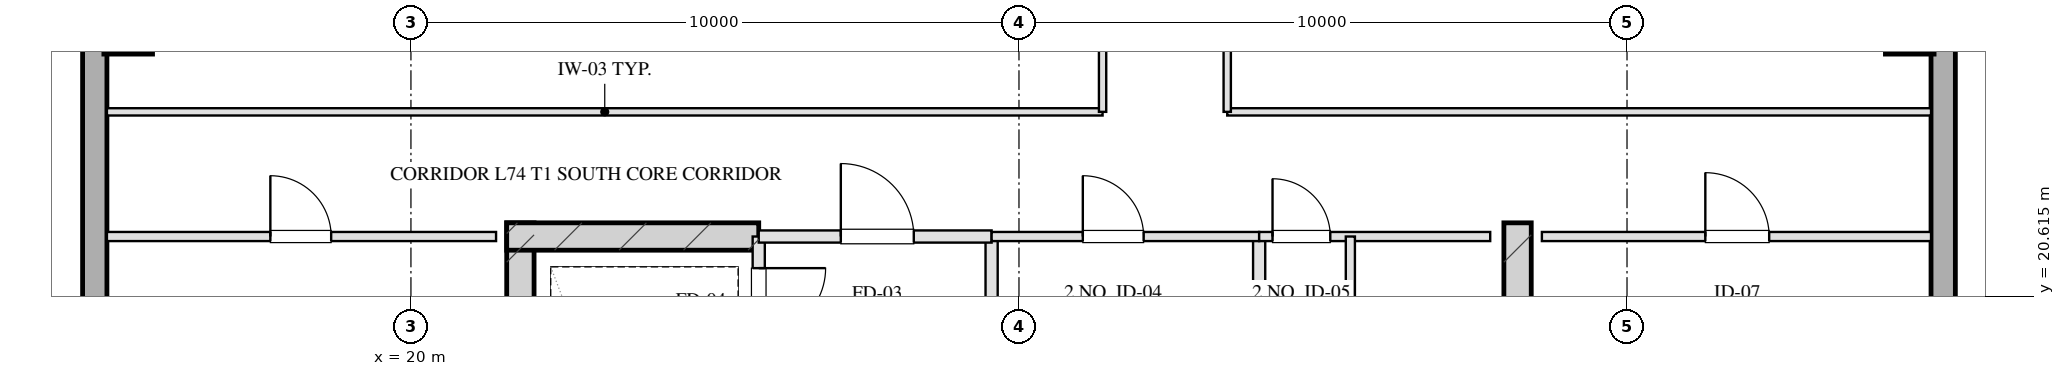
"""IFC4 building model, lengths in metres.
Left out: names, types, materials, properties, quantities, classifications, styles, units other than length and angle.
Written with IfcOpenShell. Run it as: python <this file> out.ifc"""

import sys

from ifc_helpers import new_model, si_unit, direction, frame, frame_2d, origin, origin_2d, place, context, subcontext, project, spatial, rectangle, hollow_rectangle, extrude, element, fill, save


model = new_model("IFC4")
c1 = context("Model", 3, precision=1e-05, world=origin(), true_north=direction((0.0, 1.0)))
c2 = subcontext(c1, "Body", "Model", "MODEL_VIEW")
j1 = project(units=[si_unit("LENGTHUNIT", "METRE"), si_unit("PLANEANGLEUNIT", "RADIAN")], contexts=[c1])
p1 = place(None, origin())
s1 = spatial("IfcSite", under=j1, at=p1, CompositionType="ELEMENT")
p2 = place(p1, origin())
s2 = spatial("IfcBuilding", under=s1, at=p2, CompositionType="ELEMENT")
p3 = place(p2, frame((0.0, 0.0, 269.6)))
s3 = spatial("IfcBuildingStorey", under=s2, at=p3, CompositionType="ELEMENT", Elevation=269.6)
for number, where, z_axis, x_axis in (
    (1, (21.8, 21.825, 0.0), (0.0, 0.0, 1.0), (0.0, -1.0, 0.0)),
    (2, (38.2, 21.825, 0.0), (0.0, 0.0, 1.0), (0.0, -1.0, 0.0)),
):
    element("IfcWall", number, at=place(p3, frame(where, z_axis=z_axis, x_axis=x_axis)), inside=s3, PredefinedType="SHEAR", context=c2, shape_type="SweptSolid", body=[
        extrude(rectangle(XDim=9.33, YDim=0.45, at=frame_2d((4.665, 0.0))), origin(), (0.0, 0.0, 1.0), 3.2),
    ])
p4 = place(p3, frame((21.575, 21.6, 0.0), z_axis=(0.0, 0.0, 1.0), x_axis=(1.0, 0.0, 0.0)))
e3 = element("IfcWall", 3, at=p4, inside=s3, PredefinedType="SHEAR", context=c2, shape_type="SweptSolid", body=[
    extrude(rectangle(XDim=4.145, YDim=0.45, at=frame_2d((2.073, 0.0))), origin(), (0.0, 0.0, 1.0), 3.2),
])
for number, where, z_axis, x_axis in (
    (4, (15.35, 25.0, 0.0), (0.0, 0.0, 1.0), (1.0, 0.0, 0.0)),
    (5, (44.65, 25.0, 0.0), (0.0, 0.0, 1.0), (1.0, 0.0, 0.0)),
):
    element("IfcColumn", number, at=place(p3, frame(where, z_axis=z_axis, x_axis=x_axis)), inside=s3, PredefinedType="COLUMN", context=c2, shape_type="SweptSolid", body=[
        extrude(hollow_rectangle(XDim=0.8, YDim=0.8, WallThickness=0.028, at=origin_2d()), origin(), (0.0, 0.0, 1.0), 3.201),
    ])
p5 = place(p3, frame((14.8, 13.1, 0.0), z_axis=(0.0, 0.0, 1.0), x_axis=(0.0, 1.0, 0.0)))
e6 = element("IfcWall", 6, at=p5, inside=s3, PredefinedType="SOLIDWALL", context=c2, shape_type="SweptSolid", body=[
    extrude(rectangle(XDim=41.8, YDim=0.4, at=frame_2d((20.9, 0.0))), origin(), (0.0, 0.0, 1.0), 2.36),
])
p6 = place(p5, frame((22.525, 0.0, 0.75)))
e7 = element("IfcOpeningElement", 7, at=p6, cuts=e6, PredefinedType="OPENING", context=c2, shape_type="SweptSolid", body=[
    extrude(rectangle(XDim=1.95, YDim=1.21, at=frame_2d((0.975, 0.605))), frame((0.0, 0.21, 0.0), z_axis=(0.0, -1.0, 0.0), x_axis=(1.0, 0.0, 0.0)), (0.0, 0.0, 1.0), 0.42),
])
p7 = place(p5, frame((26.325, 0.0, 0.75)))
e8 = element("IfcOpeningElement", 8, at=p7, cuts=e6, PredefinedType="OPENING", context=c2, shape_type="SweptSolid", body=[
    extrude(rectangle(XDim=1.95, YDim=1.21, at=frame_2d((0.975, 0.605))), frame((0.0, 0.21, 0.0), z_axis=(0.0, -1.0, 0.0), x_axis=(1.0, 0.0, 0.0)), (0.0, 0.0, 1.0), 0.42),
])
p8 = place(p5, frame((14.55, 0.0, 0.0)))
e9 = element("IfcOpeningElement", 9, at=p8, cuts=e6, PredefinedType="OPENING", context=c2, shape_type="SweptSolid", body=[
    extrude(rectangle(XDim=1.1, YDim=2.15, at=frame_2d((0.55, 1.075))), frame((0.0, 0.21, 0.0), z_axis=(0.0, -1.0, 0.0), x_axis=(1.0, 0.0, 0.0)), (0.0, 0.0, 1.0), 0.42),
])
p9 = place(p3, frame((45.2, 54.9, 0.0), z_axis=(0.0, 0.0, 1.0), x_axis=(0.0, -1.0, 0.0)))
e10 = element("IfcWall", 10, at=p9, inside=s3, PredefinedType="SOLIDWALL", context=c2, shape_type="SweptSolid", body=[
    extrude(rectangle(XDim=41.8, YDim=0.4, at=frame_2d((20.9, 0.0))), origin(), (0.0, 0.0, 1.0), 2.36),
])
p10 = place(p9, frame((17.325, 0.0, 0.75)))
e11 = element("IfcOpeningElement", 11, at=p10, cuts=e10, PredefinedType="OPENING", context=c2, shape_type="SweptSolid", body=[
    extrude(rectangle(XDim=1.95, YDim=1.21, at=frame_2d((0.975, 0.605))), frame((0.0, 0.21, 0.0), z_axis=(0.0, -1.0, 0.0), x_axis=(1.0, 0.0, 0.0)), (0.0, 0.0, 1.0), 0.42),
])
p11 = place(p9, frame((13.525, 0.0, 0.75)))
e12 = element("IfcOpeningElement", 12, at=p11, cuts=e10, PredefinedType="OPENING", context=c2, shape_type="SweptSolid", body=[
    extrude(rectangle(XDim=1.95, YDim=1.21, at=frame_2d((0.975, 0.605))), frame((0.0, 0.21, 0.0), z_axis=(0.0, -1.0, 0.0), x_axis=(1.0, 0.0, 0.0)), (0.0, 0.0, 1.0), 0.42),
])
p12 = place(p9, frame((23.45, 0.0, 0.0)))
e13 = element("IfcOpeningElement", 13, at=p12, cuts=e10, PredefinedType="OPENING", context=c2, shape_type="SweptSolid", body=[
    extrude(rectangle(XDim=1.1, YDim=2.15, at=frame_2d((0.55, 1.075))), frame((0.0, 0.21, 0.0), z_axis=(0.0, -1.0, 0.0), x_axis=(1.0, 0.0, 0.0)), (0.0, 0.0, 1.0), 0.42),
])
p13 = place(p3, frame((25.72, 21.6, 0.0), z_axis=(0.0, 0.0, 1.0), x_axis=(0.0, -1.0, 0.0)))
e14 = element("IfcWall", 14, at=p13, inside=s3, PredefinedType="PARTITIONING", context=c2, shape_type="SweptSolid", body=[
    extrude(rectangle(XDim=1.9, YDim=0.2, at=frame_2d((0.95, 0.0))), origin(), (0.0, 0.0, 1.0), 2.925),
])
p14 = place(p13, frame((0.52, 0.0, 0.0)))
e15 = element("IfcOpeningElement", 15, at=p14, cuts=e14, PredefinedType="OPENING", context=c2, shape_type="SweptSolid", body=[
    extrude(rectangle(XDim=1.1, YDim=2.05, at=frame_2d((0.55, 1.025))), frame((0.0, 0.11, 0.0), z_axis=(0.0, -1.0, 0.0), x_axis=(1.0, 0.0, 0.0)), (0.0, 0.0, 1.0), 0.22),
])
p15 = place(p3, frame((29.55, 21.6, 0.0), z_axis=(0.0, 0.0, 1.0), x_axis=(0.0, -1.0, 0.0)))
e16 = element("IfcWall", 16, at=p15, inside=s3, PredefinedType="PARTITIONING", context=c2, shape_type="SweptSolid", body=[
    extrude(rectangle(XDim=8.43, YDim=0.2, at=frame_2d((4.215, 0.0))), origin(), (0.0, 0.0, 1.0), 2.925),
])
p16 = place(p3, frame((25.72, 21.6, 0.0), z_axis=(0.0, 0.0, 1.0), x_axis=(1.0, 0.0, 0.0)))
e17 = element("IfcWall", 17, at=p16, inside=s3, PredefinedType="PARTITIONING", context=c2, shape_type="SweptSolid", body=[
    extrude(rectangle(XDim=3.83, YDim=0.2, at=frame_2d((1.915, 0.0))), origin(), (0.0, 0.0, 1.0), 2.925),
])
p17 = place(p16, frame((1.35, 0.0, 0.0)))
e18 = element("IfcOpeningElement", 18, at=p17, cuts=e17, PredefinedType="OPENING", context=c2, shape_type="SweptSolid", body=[
    extrude(rectangle(XDim=1.2, YDim=2.05, at=frame_2d((0.6, 1.025))), frame((0.0, 0.11, 0.0), z_axis=(0.0, -1.0, 0.0), x_axis=(1.0, 0.0, 0.0)), (0.0, 0.0, 1.0), 0.22),
])
p18 = place(p3, frame((33.95, 21.6, 0.0), z_axis=(0.0, 0.0, 1.0), x_axis=(0.0, -1.0, 0.0)))
e19 = element("IfcWall", 19, at=p18, inside=s3, PredefinedType="PARTITIONING", context=c2, shape_type="SweptSolid", body=[
    extrude(rectangle(XDim=8.43, YDim=0.2, at=frame_2d((4.215, 0.0))), origin(), (0.0, 0.0, 1.0), 2.925),
])
p19 = place(p3, frame((29.55, 21.6, 0.0), z_axis=(0.0, 0.0, 1.0), x_axis=(1.0, 0.0, 0.0)))
e20 = element("IfcWall", 20, at=p19, inside=s3, PredefinedType="PARTITIONING", context=c2, shape_type="SweptSolid", body=[
    extrude(rectangle(XDim=4.4, YDim=0.15, at=frame_2d((2.2, 0.0))), origin(), (0.0, 0.0, 1.0), 2.925),
])
p20 = place(p19, frame((1.5, 0.0, 0.0)))
e21 = element("IfcOpeningElement", 21, at=p20, cuts=e20, PredefinedType="OPENING", context=c2, shape_type="SweptSolid", body=[
    extrude(rectangle(XDim=1.0, YDim=2.05, at=frame_2d((0.5, 1.025))), frame((0.0, 0.085, 0.0), z_axis=(0.0, -1.0, 0.0), x_axis=(1.0, 0.0, 0.0)), (0.0, 0.0, 1.0), 0.17),
])
p21 = place(p3, frame((33.95, 21.6, 0.0), z_axis=(0.0, 0.0, 1.0), x_axis=(1.0, 0.0, 0.0)))
e22 = element("IfcWall", 22, at=p21, inside=s3, PredefinedType="PARTITIONING", context=c2, shape_type="SweptSolid", body=[
    extrude(rectangle(XDim=3.8, YDim=0.15, at=frame_2d((1.9, 0.0))), origin(), (0.0, 0.0, 1.0), 2.925),
])
p22 = place(p21, frame((0.22, 0.0, 0.0)))
e23 = element("IfcOpeningElement", 23, at=p22, cuts=e22, PredefinedType="OPENING", context=c2, shape_type="SweptSolid", body=[
    extrude(rectangle(XDim=0.95, YDim=2.05, at=frame_2d((0.475, 1.025))), frame((0.0, 0.085, 0.0), z_axis=(0.0, -1.0, 0.0), x_axis=(1.0, 0.0, 0.0)), (0.0, 0.0, 1.0), 0.17),
])
p23 = place(p3, frame((35.45, 21.6, 0.0), z_axis=(0.0, 0.0, 1.0), x_axis=(0.0, -1.0, 0.0)))
e24 = element("IfcWall", 24, at=p23, inside=s3, PredefinedType="PARTITIONING", context=c2, shape_type="SweptSolid", body=[
    extrude(rectangle(XDim=8.43, YDim=0.15, at=frame_2d((4.215, 0.0))), origin(), (0.0, 0.0, 1.0), 2.515),
])
p24 = place(p23, frame((2.55, 0.0, 0.0)))
e25 = element("IfcOpeningElement", 25, at=p24, cuts=e24, PredefinedType="OPENING", context=c2, shape_type="SweptSolid", body=[
    extrude(rectangle(XDim=0.95, YDim=2.05, at=frame_2d((0.475, 1.025))), frame((0.0, 0.085, 0.0), z_axis=(0.0, -1.0, 0.0), x_axis=(1.0, 0.0, 0.0)), (0.0, 0.0, 1.0), 0.17),
])
p25 = place(p23, frame((5.8, 0.0, 0.0)))
e26 = element("IfcOpeningElement", 26, at=p25, cuts=e24, PredefinedType="OPENING", context=c2, shape_type="SweptSolid", body=[
    extrude(rectangle(XDim=0.9, YDim=2.05, at=frame_2d((0.45, 1.025))), frame((0.0, 0.085, 0.0), z_axis=(0.0, -1.0, 0.0), x_axis=(1.0, 0.0, 0.0)), (0.0, 0.0, 1.0), 0.17),
])
p26 = place(p3, frame((15.0, 21.6, 0.0), z_axis=(0.0, 0.0, 1.0), x_axis=(1.0, 0.0, 0.0)))
e27 = element("IfcWall", 27, at=p26, inside=s3, PredefinedType="PARTITIONING", context=c2, shape_type="SweptSolid", body=[
    extrude(rectangle(XDim=6.4, YDim=0.15, at=frame_2d((3.2, 0.0))), origin(), (0.0, 0.0, 1.0), 2.925),
])
p27 = place(p26, frame((2.688, 0.0, 0.0)))
e28 = element("IfcOpeningElement", 28, at=p27, cuts=e27, PredefinedType="OPENING", context=c2, shape_type="SweptSolid", body=[
    extrude(rectangle(XDim=1.0, YDim=2.05, at=frame_2d((0.5, 1.025))), frame((0.0, 0.085, 0.0), z_axis=(0.0, -1.0, 0.0), x_axis=(1.0, 0.0, 0.0)), (0.0, 0.0, 1.0), 0.17),
])
p28 = place(p3, frame((38.6, 21.6, 0.0), z_axis=(0.0, 0.0, 1.0), x_axis=(1.0, 0.0, 0.0)))
e29 = element("IfcWall", 29, at=p28, inside=s3, PredefinedType="PARTITIONING", context=c2, shape_type="SweptSolid", body=[
    extrude(rectangle(XDim=6.4, YDim=0.15, at=frame_2d((3.2, 0.0))), origin(), (0.0, 0.0, 1.0), 2.925),
])
p29 = place(p28, frame((2.688, 0.0, 0.0)))
e30 = element("IfcOpeningElement", 30, at=p29, cuts=e29, PredefinedType="OPENING", context=c2, shape_type="SweptSolid", body=[
    extrude(rectangle(XDim=1.05, YDim=2.05, at=frame_2d((0.525, 1.025))), frame((0.0, 0.085, 0.0), z_axis=(0.0, -1.0, 0.0), x_axis=(1.0, 0.0, 0.0)), (0.0, 0.0, 1.0), 0.17),
])
p30 = place(p3, frame((15.0, 23.65, 0.0), z_axis=(0.0, 0.0, 1.0), x_axis=(1.0, 0.0, 0.0)))
e31 = element("IfcWall", 31, at=p30, inside=s3, PredefinedType="PARTITIONING", context=c2, shape_type="SweptSolid", body=[
    extrude(rectangle(XDim=16.375, YDim=0.12, at=frame_2d((8.188, 0.0))), origin(), (0.0, 0.0, 1.0), 2.925),
])
p31 = place(p3, frame((33.425, 23.65, 0.0), z_axis=(0.0, 0.0, 1.0), x_axis=(1.0, 0.0, 0.0)))
e32 = element("IfcWall", 32, at=p31, inside=s3, PredefinedType="PARTITIONING", context=c2, shape_type="SweptSolid", body=[
    extrude(rectangle(XDim=11.575, YDim=0.12, at=frame_2d((5.788, 0.0))), origin(), (0.0, 0.0, 1.0), 2.925),
])
p32 = place(p3, frame((31.375, 23.65, 0.0), z_axis=(0.0, 0.0, 1.0), x_axis=(0.0, 1.0, 0.0)))
e33 = element("IfcWall", 33, at=p32, inside=s3, PredefinedType="PARTITIONING", context=c2, shape_type="SweptSolid", body=[
    extrude(rectangle(XDim=20.7, YDim=0.12, at=frame_2d((10.35, 0.0))), origin(), (0.0, 0.0, 1.0), 2.925),
])
p33 = place(p32, frame((2.675, 0.0, 0.0)))
e34 = element("IfcOpeningElement", 34, at=p33, cuts=e33, PredefinedType="OPENING", context=c2, shape_type="SweptSolid", body=[
    extrude(rectangle(XDim=1.0, YDim=2.05, at=frame_2d((0.5, 1.025))), frame((0.0, 0.07, 0.0), z_axis=(0.0, -1.0, 0.0), x_axis=(1.0, 0.0, 0.0)), (0.0, 0.0, 1.0), 0.14),
])
p34 = place(p32, frame((9.85, 0.0, 0.0)))
e35 = element("IfcOpeningElement", 35, at=p34, cuts=e33, PredefinedType="OPENING", context=c2, shape_type="SweptSolid", body=[
    extrude(rectangle(XDim=1.0, YDim=2.05, at=frame_2d((0.5, 1.025))), frame((0.0, 0.07, 0.0), z_axis=(0.0, -1.0, 0.0), x_axis=(1.0, 0.0, 0.0)), (0.0, 0.0, 1.0), 0.14),
])
p35 = place(p32, frame((17.025, 0.0, 0.0)))
e36 = element("IfcOpeningElement", 36, at=p35, cuts=e33, PredefinedType="OPENING", context=c2, shape_type="SweptSolid", body=[
    extrude(rectangle(XDim=1.0, YDim=2.05, at=frame_2d((0.5, 1.025))), frame((0.0, 0.07, 0.0), z_axis=(0.0, -1.0, 0.0), x_axis=(1.0, 0.0, 0.0)), (0.0, 0.0, 1.0), 0.14),
])
p36 = place(p3, frame((33.425, 23.65, 0.0), z_axis=(0.0, 0.0, 1.0), x_axis=(0.0, 1.0, 0.0)))
e37 = element("IfcWall", 37, at=p36, inside=s3, PredefinedType="PARTITIONING", context=c2, shape_type="SweptSolid", body=[
    extrude(rectangle(XDim=20.7, YDim=0.12, at=frame_2d((10.35, 0.0))), origin(), (0.0, 0.0, 1.0), 2.925),
])
p37 = place(p36, frame((2.175, 0.0, 0.0)))
e38 = element("IfcOpeningElement", 38, at=p37, cuts=e37, PredefinedType="OPENING", context=c2, shape_type="SweptSolid", body=[
    extrude(rectangle(XDim=1.0, YDim=2.05, at=frame_2d((0.5, 1.025))), frame((0.0, 0.07, 0.0), z_axis=(0.0, -1.0, 0.0), x_axis=(1.0, 0.0, 0.0)), (0.0, 0.0, 1.0), 0.14),
])
p38 = place(p36, frame((6.75, 0.0, 0.0)))
e39 = element("IfcOpeningElement", 39, at=p38, cuts=e37, PredefinedType="OPENING", context=c2, shape_type="SweptSolid", body=[
    extrude(rectangle(XDim=1.05, YDim=2.05, at=frame_2d((0.525, 1.025))), frame((0.0, 0.07, 0.0), z_axis=(0.0, -1.0, 0.0), x_axis=(1.0, 0.0, 0.0)), (0.0, 0.0, 1.0), 0.14),
])
p39 = place(p36, frame((11.25, 0.0, 0.0)))
e40 = element("IfcOpeningElement", 40, at=p39, cuts=e37, PredefinedType="OPENING", context=c2, shape_type="SweptSolid", body=[
    extrude(rectangle(XDim=1.0, YDim=2.05, at=frame_2d((0.5, 1.025))), frame((0.0, 0.07, 0.0), z_axis=(0.0, -1.0, 0.0), x_axis=(1.0, 0.0, 0.0)), (0.0, 0.0, 1.0), 0.14),
])
p40 = place(p36, frame((15.75, 0.0, 0.0)))
e41 = element("IfcOpeningElement", 41, at=p40, cuts=e37, PredefinedType="OPENING", context=c2, shape_type="SweptSolid", body=[
    extrude(rectangle(XDim=1.0, YDim=2.05, at=frame_2d((0.5, 1.025))), frame((0.0, 0.07, 0.0), z_axis=(0.0, -1.0, 0.0), x_axis=(1.0, 0.0, 0.0)), (0.0, 0.0, 1.0), 0.14),
])
p41 = place(p36, frame((18.925, 0.0, 0.0)))
e42 = element("IfcOpeningElement", 42, at=p41, cuts=e37, PredefinedType="OPENING", context=c2, shape_type="SweptSolid", body=[
    extrude(rectangle(XDim=1.0, YDim=2.05, at=frame_2d((0.5, 1.025))), frame((0.0, 0.07, 0.0), z_axis=(0.0, -1.0, 0.0), x_axis=(1.0, 0.0, 0.0)), (0.0, 0.0, 1.0), 0.14),
])
p42 = place(p14, origin())
e43 = element("IfcDoor", 43, at=p42, inside=s3, OperationType="SINGLE_SWING_LEFT", PredefinedType="DOOR", context=c2, shape_type="SweptSolid", body=[
    extrude(rectangle(XDim=1.1, YDim=2.05, at=frame_2d((0.55, 1.025))), frame((0.0, 0.025, 0.0), z_axis=(0.0, -1.0, 0.0), x_axis=(1.0, 0.0, 0.0)), (0.0, 0.0, 1.0), 0.05),
])
fill(e15, e43)
p43 = place(p17, origin())
e44 = element("IfcDoor", 44, at=p43, inside=s3, OperationType="SINGLE_SWING_LEFT", PredefinedType="DOOR", context=c2, shape_type="SweptSolid", body=[
    extrude(rectangle(XDim=1.2, YDim=2.05, at=frame_2d((0.6, 1.025))), frame((0.0, 0.025, 0.0), z_axis=(0.0, -1.0, 0.0), x_axis=(1.0, 0.0, 0.0)), (0.0, 0.0, 1.0), 0.05),
])
fill(e18, e44)
p44 = place(p20, origin())
e45 = element("IfcDoor", 45, at=p44, inside=s3, OperationType="SINGLE_SWING_LEFT", PredefinedType="DOOR", context=c2, shape_type="SweptSolid", body=[
    extrude(rectangle(XDim=1.0, YDim=2.05, at=frame_2d((0.5, 1.025))), frame((0.0, 0.025, 0.0), z_axis=(0.0, -1.0, 0.0), x_axis=(1.0, 0.0, 0.0)), (0.0, 0.0, 1.0), 0.05),
])
fill(e21, e45)
p45 = place(p22, origin())
e46 = element("IfcDoor", 46, at=p45, inside=s3, OperationType="SINGLE_SWING_LEFT", PredefinedType="DOOR", context=c2, shape_type="SweptSolid", body=[
    extrude(rectangle(XDim=0.95, YDim=2.05, at=frame_2d((0.475, 1.025))), frame((0.0, 0.025, 0.0), z_axis=(0.0, -1.0, 0.0), x_axis=(1.0, 0.0, 0.0)), (0.0, 0.0, 1.0), 0.05),
])
fill(e23, e46)
p46 = place(p27, origin())
e47 = element("IfcDoor", 47, at=p46, inside=s3, OperationType="SINGLE_SWING_LEFT", PredefinedType="DOOR", context=c2, shape_type="SweptSolid", body=[
    extrude(rectangle(XDim=1.0, YDim=2.05, at=frame_2d((0.5, 1.025))), frame((0.0, 0.025, 0.0), z_axis=(0.0, -1.0, 0.0), x_axis=(1.0, 0.0, 0.0)), (0.0, 0.0, 1.0), 0.05),
])
fill(e28, e47)
p47 = place(p29, origin())
e48 = element("IfcDoor", 48, at=p47, inside=s3, OperationType="SINGLE_SWING_LEFT", PredefinedType="DOOR", context=c2, shape_type="SweptSolid", body=[
    extrude(rectangle(XDim=1.05, YDim=2.05, at=frame_2d((0.525, 1.025))), frame((0.0, 0.025, 0.0), z_axis=(0.0, -1.0, 0.0), x_axis=(1.0, 0.0, 0.0)), (0.0, 0.0, 1.0), 0.05),
])
fill(e30, e48)
save(model, sys.argv[1])
